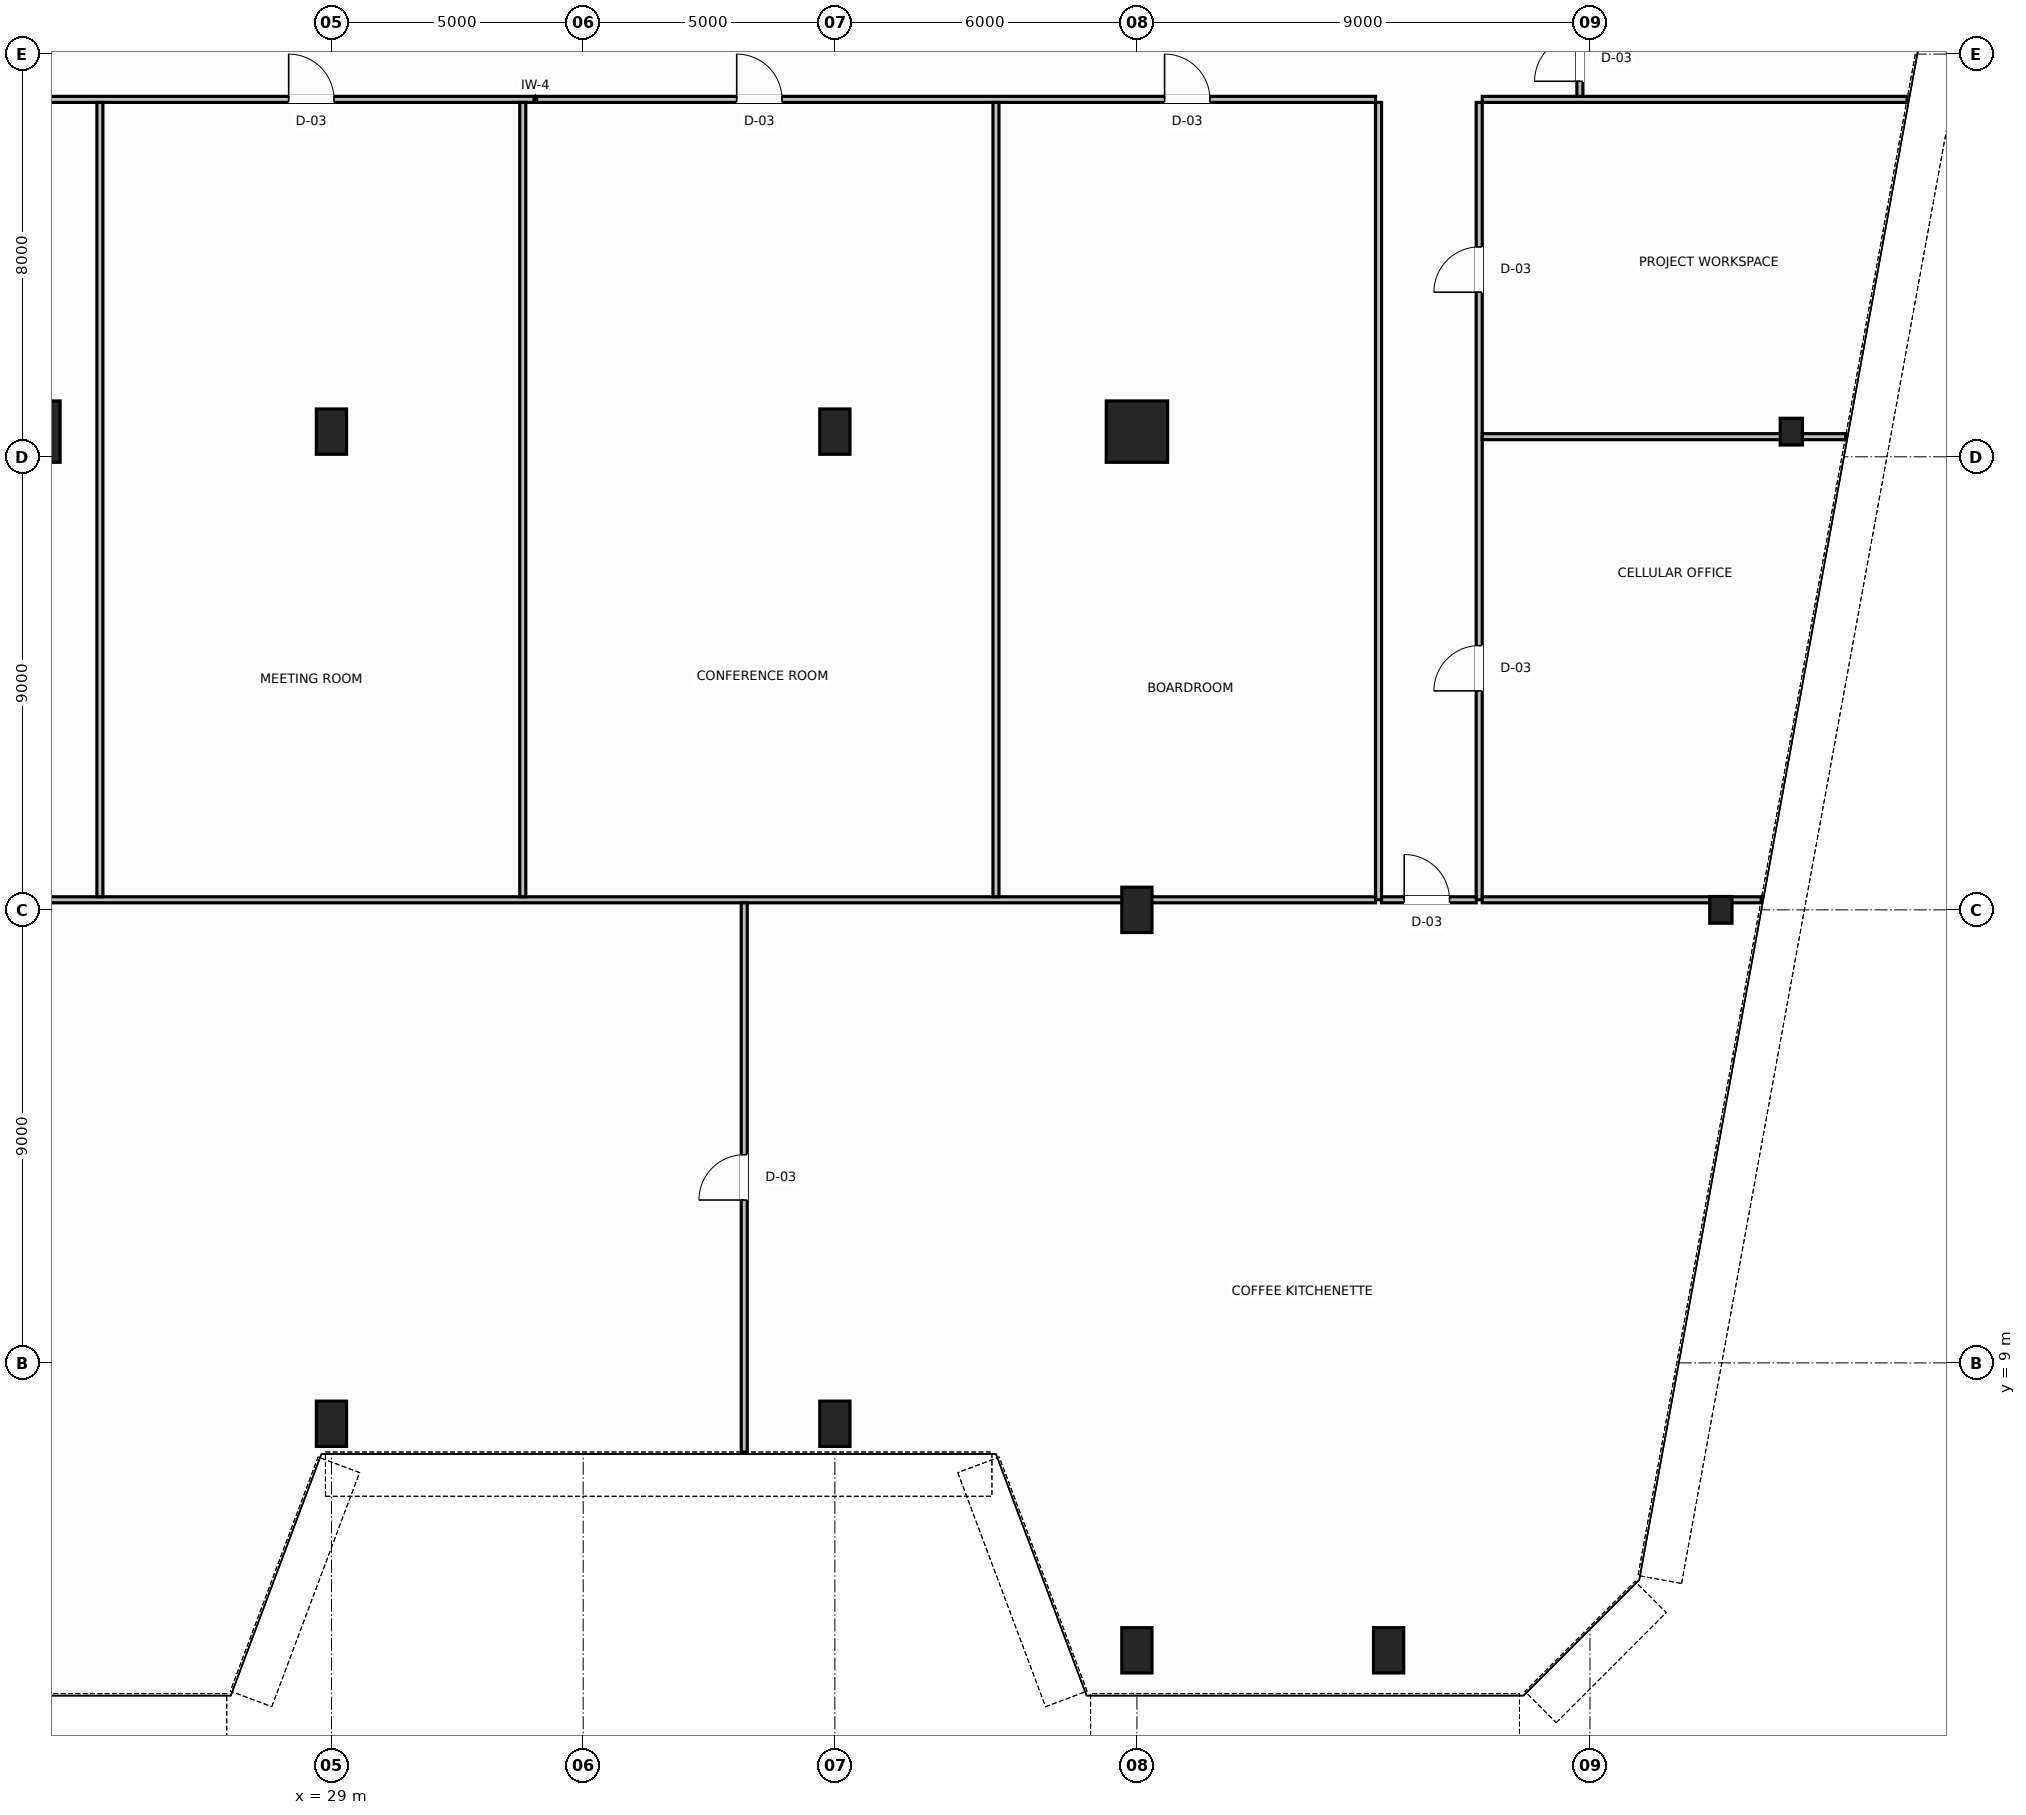
"""IFC4 building model, lengths in metres.
Left out: names, types, materials, properties, quantities, classifications, styles, units other than length and angle.
Written with IfcOpenShell. Run it as: python <this file> out.ifc"""

import sys

from ifc_helpers import new_model, si_unit, direction, frame, frame_2d, origin, origin_2d, place, context, subcontext, project, spatial, rectangle, hollow_rectangle, hollow_circle, i_section, extrude, source, transform, mapped, element, fill, save


model = new_model("IFC4")
c1 = context("Model", 3, precision=1e-05, world=origin(), true_north=direction((0.0, 1.0)))
c2 = subcontext(c1, "Body", "Model", "MODEL_VIEW")
j1 = project(units=[si_unit("LENGTHUNIT", "METRE"), si_unit("PLANEANGLEUNIT", "RADIAN")], contexts=[c1])
p1 = place(None, origin())
s1 = spatial("IfcSite", under=j1, at=p1, CompositionType="ELEMENT")
p2 = place(p1, origin())
s2 = spatial("IfcBuilding", under=s1, at=p2, CompositionType="ELEMENT")
p3 = place(p2, frame((0.0, 0.0, 56.8)))
s3 = spatial("IfcBuildingStorey", under=s2, at=p3, CompositionType="ELEMENT", Elevation=56.8)
m1 = source(origin(), c2, "Body", "SweptSolid", [
    extrude(i_section(OverallWidth=0.442, OverallDepth=0.531, WebThickness=0.065, FlangeThickness=0.076, FilletRadius=0.015, at=origin_2d()), origin(), (0.0, 0.0, 1.0), 3.8),
])
for number, where, z_axis, x_axis in (
    (1, (58.0, 27.5, 0.0), (0.0, 0.0, 1.0), (1.0, 0.0, 0.0)),
    (2, (56.6, 18.0, 0.0), (0.0, 0.0, 1.0), (1.0, 0.0, 0.0)),
):
    element("IfcColumn", number, at=place(p3, frame(where, z_axis=z_axis, x_axis=x_axis)), inside=s3, PredefinedType="COLUMN", context=c2, shape_type="MappedRepresentation", body=[
        mapped(m1, transform((0.0, 0.0, 0.0), scale=1.0)),
    ])
m2 = source(origin(), c2, "Body", "SweptSolid", [
    extrude(hollow_circle(Radius=0.61, WallThickness=0.05, at=origin_2d()), origin(), (0.0, 0.0, 1.0), 3.8),
])
p4 = place(p3, frame((23.0, 27.5, 0.0), z_axis=(0.0, 0.0, 1.0), x_axis=(1.0, 0.0, 0.0)))
e3 = element("IfcColumn", 3, at=p4, inside=s3, PredefinedType="COLUMN", context=c2, shape_type="MappedRepresentation", body=[
    mapped(m2, transform((0.0, 0.0, 0.0), scale=1.0)),
])
m3 = source(origin(), c2, "Body", "SweptSolid", [
    extrude(hollow_rectangle(XDim=0.6, YDim=0.9, WallThickness=0.04, InnerFilletRadius=0.04, OuterFilletRadius=0.08, at=origin_2d()), origin(), (0.0, 0.0, 1.0), 3.8),
])
for number, where, z_axis, x_axis in (
    (4, (29.0, 27.5, 0.0), (0.0, 0.0, 1.0), (1.0, 0.0, 0.0)),
    (5, (39.0, 27.5, 0.0), (0.0, 0.0, 1.0), (1.0, 0.0, 0.0)),
):
    element("IfcColumn", number, at=place(p3, frame(where, z_axis=z_axis, x_axis=x_axis)), inside=s3, PredefinedType="COLUMN", context=c2, shape_type="MappedRepresentation", body=[
        mapped(m3, transform((0.0, 0.0, 0.0), scale=1.0)),
    ])
p5 = place(p3, frame((45.0, 27.5, 0.0), z_axis=(0.0, 0.0, 1.0), x_axis=(1.0, 0.0, 0.0)))
e6 = element("IfcColumn", 6, at=p5, inside=s3, PredefinedType="COLUMN", context=c2, shape_type="MappedRepresentation", body=[
    mapped(m2, transform((0.0, 0.0, 0.0), scale=1.0)),
])
p6 = place(p3, frame((45.0, 18.0, 0.0), z_axis=(0.0, 0.0, 1.0), x_axis=(1.0, 0.0, 0.0)))
e7 = element("IfcColumn", 7, at=p6, inside=s3, PredefinedType="COLUMN", context=c2, shape_type="MappedRepresentation", body=[
    mapped(m3, transform((0.0, 0.0, 0.0), scale=1.0)),
])
m4 = source(origin(), c2, "Body", "SweptSolid", [
    extrude(hollow_rectangle(XDim=0.6, YDim=0.9, WallThickness=0.04, InnerFilletRadius=0.04, OuterFilletRadius=0.08, at=origin_2d()), origin(), (0.0, 0.0, 1.0), 3.744),
])
for number, where, z_axis, x_axis in (
    (8, (29.0, 7.791, 0.032), (0.0, 0.064, 0.998), (-1.0, 0.0, 0.0)),
    (9, (39.0, 7.791, 0.032), (0.0, 0.064, 0.998), (-1.0, 0.0, 0.0)),
    (10, (45.0, 3.291, 0.032), (0.0, 0.064, 0.998), (-1.0, 0.0, 0.0)),
    (11, (50.0, 3.291, 0.032), (0.0, 0.064, 0.998), (-1.0, 0.0, 0.0)),
):
    element("IfcColumn", number, at=place(p3, frame(where, z_axis=z_axis, x_axis=x_axis)), inside=s3, PredefinedType="COLUMN", context=c2, shape_type="MappedRepresentation", body=[
        mapped(m4, transform((0.0, 0.0, 0.0), scale=1.0)),
    ])
p7 = place(p3, frame((18.26, 34.1, 0.0), z_axis=(0.0, 0.0, 1.0), x_axis=(1.0, 0.0, 0.0)))
e12 = element("IfcWall", 12, at=p7, inside=s3, PredefinedType="PARTITIONING", context=c2, shape_type="SweptSolid", body=[
    extrude(rectangle(XDim=31.48, YDim=0.12, at=frame_2d((15.74, 0.0))), origin(), (0.0, 0.0, 1.0), 3.58),
])
p8 = place(p7, frame((2.59, 0.0, 0.0)))
e13 = element("IfcOpeningElement", 13, at=p8, cuts=e12, PredefinedType="OPENING", context=c2, shape_type="SweptSolid", body=[
    extrude(rectangle(XDim=0.9, YDim=2.15, at=frame_2d((0.45, 1.075))), frame((0.0, 0.07, 0.0), z_axis=(0.0, -1.0, 0.0), x_axis=(1.0, 0.0, 0.0)), (0.0, 0.0, 1.0), 0.14),
])
p9 = place(p7, frame((9.89, 0.0, 0.0)))
e14 = element("IfcOpeningElement", 14, at=p9, cuts=e12, PredefinedType="OPENING", context=c2, shape_type="SweptSolid", body=[
    extrude(rectangle(XDim=0.9, YDim=2.15, at=frame_2d((0.45, 1.075))), frame((0.0, 0.07, 0.0), z_axis=(0.0, -1.0, 0.0), x_axis=(1.0, 0.0, 0.0)), (0.0, 0.0, 1.0), 0.14),
])
p10 = place(p7, frame((18.79, 0.0, 0.0)))
e15 = element("IfcOpeningElement", 15, at=p10, cuts=e12, PredefinedType="OPENING", context=c2, shape_type="SweptSolid", body=[
    extrude(rectangle(XDim=0.9, YDim=2.15, at=frame_2d((0.45, 1.075))), frame((0.0, 0.07, 0.0), z_axis=(0.0, -1.0, 0.0), x_axis=(1.0, 0.0, 0.0)), (0.0, 0.0, 1.0), 0.14),
])
p11 = place(p7, frame((27.29, 0.0, 0.0)))
e16 = element("IfcOpeningElement", 16, at=p11, cuts=e12, PredefinedType="OPENING", context=c2, shape_type="SweptSolid", body=[
    extrude(rectangle(XDim=0.9, YDim=2.15, at=frame_2d((0.45, 1.075))), frame((0.0, 0.07, 0.0), z_axis=(0.0, -1.0, 0.0), x_axis=(1.0, 0.0, 0.0)), (0.0, 0.0, 1.0), 0.14),
])
p12 = place(p3, frame((51.86, 34.1, 0.0), z_axis=(0.0, 0.0, 1.0), x_axis=(1.0, 0.0, 0.0)))
e17 = element("IfcWall", 17, at=p12, inside=s3, PredefinedType="PARTITIONING", context=c2, shape_type="SweptSolid", body=[
    extrude(rectangle(XDim=8.439, YDim=0.12, at=frame_2d((4.22, 0.0))), origin(), (0.0, 0.0, 1.0), 3.58),
])
p13 = place(p3, frame((53.8, 34.16, 0.0), z_axis=(0.0, 0.0, 1.0), x_axis=(0.0, 1.0, 0.0)))
e18 = element("IfcWall", 18, at=p13, inside=s3, PredefinedType="PARTITIONING", context=c2, shape_type="SweptSolid", body=[
    extrude(rectangle(XDim=2.28, YDim=0.12, at=frame_2d((1.14, 0.0))), origin(), (0.0, 0.0, 1.0), 3.58),
])
p14 = place(p13, frame((0.3, 0.0, 0.0)))
e19 = element("IfcOpeningElement", 19, at=p14, cuts=e18, PredefinedType="OPENING", context=c2, shape_type="SweptSolid", body=[
    extrude(rectangle(XDim=0.9, YDim=2.15, at=frame_2d((0.45, 1.075))), frame((0.0, 0.07, 0.0), z_axis=(0.0, -1.0, 0.0), x_axis=(1.0, 0.0, 0.0)), (0.0, 0.0, 1.0), 0.14),
])
p15 = place(p3, frame((49.8, 18.2, 0.0), z_axis=(0.0, 0.0, 1.0), x_axis=(0.0, 1.0, 0.0)))
e20 = element("IfcWall", 20, at=p15, inside=s3, PredefinedType="PARTITIONING", context=c2, shape_type="SweptSolid", body=[
    extrude(rectangle(XDim=15.84, YDim=0.12, at=frame_2d((7.92, 0.0))), origin(), (0.0, 0.0, 1.0), 3.58),
])
p16 = place(p3, frame((51.8, 18.2, 0.0), z_axis=(0.0, 0.0, 1.0), x_axis=(0.0, 1.0, 0.0)))
e21 = element("IfcWall", 21, at=p16, inside=s3, PredefinedType="PARTITIONING", context=c2, shape_type="SweptSolid", body=[
    extrude(rectangle(XDim=15.84, YDim=0.12, at=frame_2d((7.92, 0.0))), origin(), (0.0, 0.0, 1.0), 3.58),
])
p17 = place(p16, frame((4.15, 0.0, 0.0)))
e22 = element("IfcOpeningElement", 22, at=p17, cuts=e21, PredefinedType="OPENING", context=c2, shape_type="SweptSolid", body=[
    extrude(rectangle(XDim=0.9, YDim=2.15, at=frame_2d((0.45, 1.075))), frame((0.0, 0.07, 0.0), z_axis=(0.0, -1.0, 0.0), x_axis=(1.0, 0.0, 0.0)), (0.0, 0.0, 1.0), 0.14),
])
p18 = place(p16, frame((12.07, 0.0, 0.0)))
e23 = element("IfcOpeningElement", 23, at=p18, cuts=e21, PredefinedType="OPENING", context=c2, shape_type="SweptSolid", body=[
    extrude(rectangle(XDim=0.9, YDim=2.15, at=frame_2d((0.45, 1.075))), frame((0.0, 0.07, 0.0), z_axis=(0.0, -1.0, 0.0), x_axis=(1.0, 0.0, 0.0)), (0.0, 0.0, 1.0), 0.14),
])
p19 = place(p3, frame((49.86, 18.2, 0.0), z_axis=(0.0, 0.0, 1.0), x_axis=(1.0, 0.0, 0.0)))
e24 = element("IfcWall", 24, at=p19, inside=s3, PredefinedType="PARTITIONING", context=c2, shape_type="SweptSolid", body=[
    extrude(rectangle(XDim=1.88, YDim=0.12, at=frame_2d((0.94, 0.0))), origin(), (0.0, 0.0, 1.0), 2.77),
])
p20 = place(p19, frame((0.45, 0.0, 0.0)))
e25 = element("IfcOpeningElement", 25, at=p20, cuts=e24, PredefinedType="OPENING", context=c2, shape_type="SweptSolid", body=[
    extrude(rectangle(XDim=0.9, YDim=2.15, at=frame_2d((0.45, 1.075))), frame((0.0, 0.07, 0.0), z_axis=(0.0, -1.0, 0.0), x_axis=(1.0, 0.0, 0.0)), (0.0, 0.0, 1.0), 0.14),
])
p21 = place(p3, frame((51.86, 18.2, 0.0), z_axis=(0.0, 0.0, 1.0), x_axis=(1.0, 0.0, 0.0)))
e26 = element("IfcWall", 26, at=p21, inside=s3, PredefinedType="PARTITIONING", context=c2, shape_type="SweptSolid", body=[
    extrude(rectangle(XDim=5.542, YDim=0.12, at=frame_2d((2.771, 0.0))), origin(), (0.0, 0.0, 1.0), 2.77),
])
p22 = place(p3, frame((51.86, 27.4, 0.0), z_axis=(0.0, 0.0, 1.0), x_axis=(1.0, 0.0, 0.0)))
e27 = element("IfcWall", 27, at=p22, inside=s3, PredefinedType="PARTITIONING", context=c2, shape_type="SweptSolid", body=[
    extrude(rectangle(XDim=7.218, YDim=0.12, at=frame_2d((3.609, 0.0))), origin(), (0.0, 0.0, 1.0), 2.77),
])
p23 = place(p3, frame((18.26, 18.2, 0.0), z_axis=(0.0, 0.0, 1.0), x_axis=(1.0, 0.0, 0.0)))
e28 = element("IfcWall", 28, at=p23, inside=s3, PredefinedType="PARTITIONING", context=c2, shape_type="SweptSolid", body=[
    extrude(rectangle(XDim=31.48, YDim=0.12, at=frame_2d((15.74, 0.0))), origin(), (0.0, 0.0, 1.0), 2.77),
])
for number, where, z_axis, x_axis in (
    (29, (24.4, 18.26, 0.0), (0.0, 0.0, 1.0), (0.0, 1.0, 0.0)),
    (30, (32.8, 18.26, 0.0), (0.0, 0.0, 1.0), (0.0, 1.0, 0.0)),
    (31, (42.2, 18.26, 0.0), (0.0, 0.0, 1.0), (0.0, 1.0, 0.0)),
):
    element("IfcWall", number, at=place(p3, frame(where, z_axis=z_axis, x_axis=x_axis)), inside=s3, PredefinedType="PARTITIONING", context=c2, shape_type="SweptSolid", body=[
        extrude(rectangle(XDim=15.78, YDim=0.12, at=frame_2d((7.89, 0.0))), origin(), (0.0, 0.0, 1.0), 3.58),
    ])
p24 = place(p3, frame((37.2, 7.231, 0.0), z_axis=(0.0, 0.0, 1.0), x_axis=(0.0, 1.0, 0.0)))
e32 = element("IfcWall", 32, at=p24, inside=s3, PredefinedType="PARTITIONING", context=c2, shape_type="SweptSolid", body=[
    extrude(rectangle(XDim=10.909, YDim=0.12, at=frame_2d((5.455, 0.0))), origin(), (0.0, 0.0, 1.0), 3.58),
])
p25 = place(p24, frame((5.005, 0.0, 0.0)))
e33 = element("IfcOpeningElement", 33, at=p25, cuts=e32, PredefinedType="OPENING", context=c2, shape_type="SweptSolid", body=[
    extrude(rectangle(XDim=0.9, YDim=2.15, at=frame_2d((0.45, 1.075))), frame((0.0, 0.07, 0.0), z_axis=(0.0, -1.0, 0.0), x_axis=(1.0, 0.0, 0.0)), (0.0, 0.0, 1.0), 0.14),
])
m5 = source(origin(), c2, "Body", "SweptSolid", [
    extrude(rectangle(XDim=0.9, YDim=2.15, at=frame_2d((0.45, 1.075))), frame((0.0, 0.025, 0.0), z_axis=(0.0, -1.0, 0.0), x_axis=(1.0, 0.0, 0.0)), (0.0, 0.0, 1.0), 0.05),
])
p26 = place(p14, origin())
e34 = element("IfcDoor", 34, at=p26, inside=s3, OperationType="SINGLE_SWING_RIGHT", PredefinedType="DOOR", context=c2, shape_type="MappedRepresentation", body=[
    mapped(m5, transform((0.0, 0.0, 0.0), scale=1.0)),
])
fill(e19, e34)
p27 = place(p17, origin())
e35 = element("IfcDoor", 35, at=p27, inside=s3, OperationType="SINGLE_SWING_RIGHT", PredefinedType="DOOR", context=c2, shape_type="MappedRepresentation", body=[
    mapped(m5, transform((0.0, 0.0, 0.0), scale=1.0)),
])
fill(e22, e35)
p28 = place(p18, origin())
e36 = element("IfcDoor", 36, at=p28, inside=s3, OperationType="SINGLE_SWING_LEFT", PredefinedType="DOOR", context=c2, shape_type="MappedRepresentation", body=[
    mapped(m5, transform((0.0, 0.0, 0.0), scale=1.0)),
])
fill(e23, e36)
p29 = place(p9, origin())
e37 = element("IfcDoor", 37, at=p29, inside=s3, OperationType="SINGLE_SWING_RIGHT", PredefinedType="DOOR", context=c2, shape_type="MappedRepresentation", body=[
    mapped(m5, transform((0.0, 0.0, 0.0), scale=1.0)),
])
fill(e14, e37)
p30 = place(p10, origin())
e38 = element("IfcDoor", 38, at=p30, inside=s3, OperationType="SINGLE_SWING_LEFT", PredefinedType="DOOR", context=c2, shape_type="MappedRepresentation", body=[
    mapped(m5, transform((0.0, 0.0, 0.0), scale=1.0)),
])
fill(e15, e38)
p31 = place(p11, origin())
e39 = element("IfcDoor", 39, at=p31, inside=s3, OperationType="SINGLE_SWING_RIGHT", PredefinedType="DOOR", context=c2, shape_type="MappedRepresentation", body=[
    mapped(m5, transform((0.0, 0.0, 0.0), scale=1.0)),
])
fill(e16, e39)
p32 = place(p25, origin())
e40 = element("IfcDoor", 40, at=p32, inside=s3, OperationType="SINGLE_SWING_RIGHT", PredefinedType="DOOR", context=c2, shape_type="MappedRepresentation", body=[
    mapped(m5, transform((0.0, 0.0, 0.0), scale=1.0)),
])
fill(e33, e40)
p33 = place(p20, origin())
e41 = element("IfcDoor", 41, at=p33, inside=s3, OperationType="SINGLE_SWING_RIGHT", PredefinedType="DOOR", context=c2, shape_type="MappedRepresentation", body=[
    mapped(m5, transform((0.0, 0.0, 0.0), scale=1.0)),
])
fill(e25, e41)
save(model, sys.argv[1])
